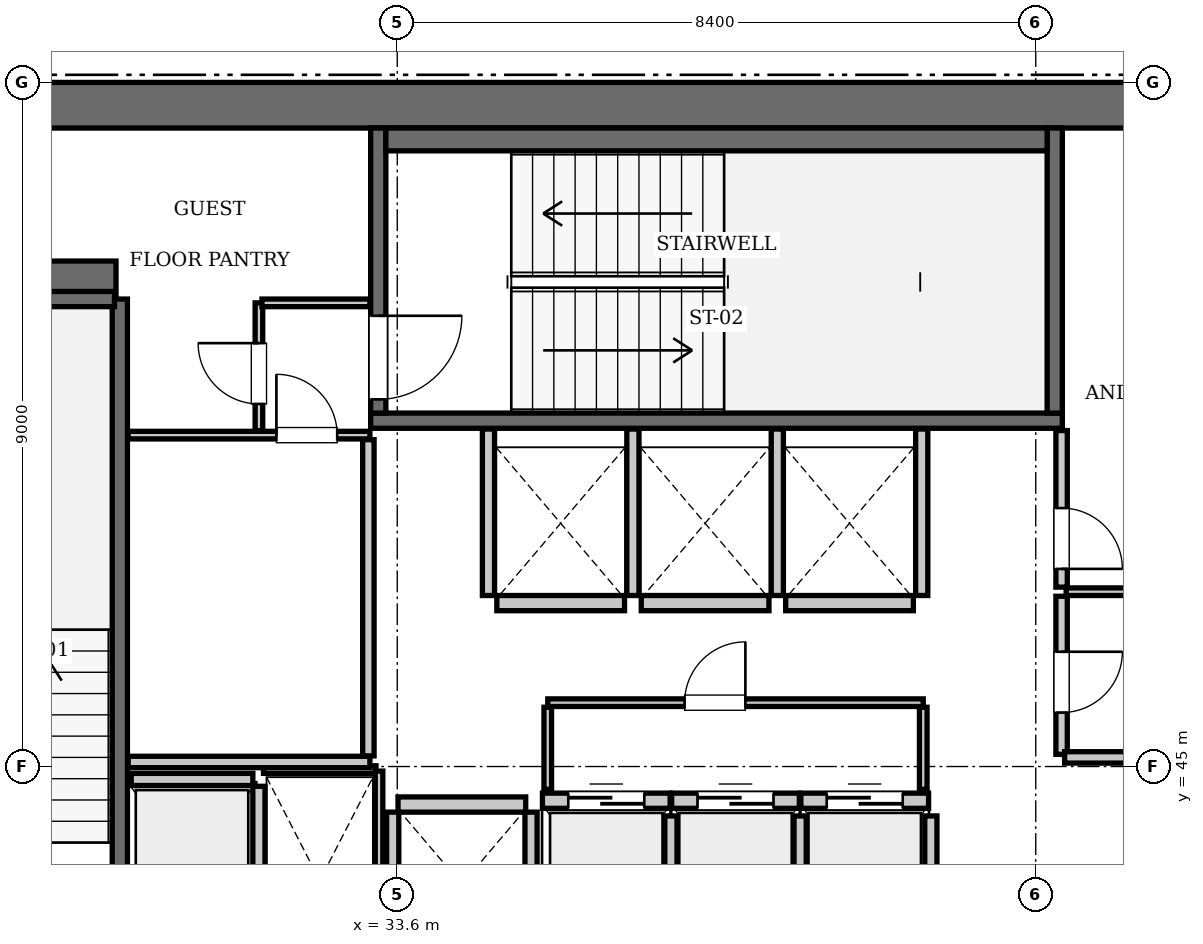
"""IFC4 building model, lengths in metres.
Left out: names, types, materials, properties, quantities, classifications, styles, units other than length and angle.
Written with IfcOpenShell. Run it as: python <this file> out.ifc"""

import sys

from ifc_helpers import new_model, si_unit, direction, frame, frame_2d, origin, place, context, subcontext, project, spatial, rectangle, extrude, element, fill, save


model = new_model("IFC4")
c1 = context("Model", 3, precision=1e-05, world=origin(), true_north=direction((0.0, 1.0)))
c2 = subcontext(c1, "Body", "Model", "MODEL_VIEW")
j1 = project(units=[si_unit("LENGTHUNIT", "METRE"), si_unit("PLANEANGLEUNIT", "RADIAN")], contexts=[c1])
p1 = place(None, origin())
s1 = spatial("IfcSite", under=j1, at=p1, CompositionType="ELEMENT")
p2 = place(p1, origin())
s2 = spatial("IfcBuilding", under=s1, at=p2, CompositionType="ELEMENT")
p3 = place(p2, frame((0.0, 0.0, 341.25)))
s3 = spatial("IfcBuildingStorey", under=s2, at=p3, CompositionType="ELEMENT", Elevation=341.25)
p4 = place(p3, frame((25.2, 53.7, 0.0), z_axis=(0.0, 0.0, 1.0), x_axis=(1.0, 0.0, 0.0)))
e1 = element("IfcWall", 1, at=p4, inside=s3, PredefinedType="SHEAR", context=c2, shape_type="SweptSolid", body=[
    extrude(rectangle(XDim=25.2, YDim=0.6, at=frame_2d((12.6, 0.0))), origin(), (0.0, 0.0, 1.0), 3.85),
])
p5 = place(p3, frame((25.8, 51.4, 0.0), z_axis=(0.0, 0.0, 1.0), x_axis=(1.0, 0.0, 0.0)))
e2 = element("IfcWall", 2, at=p5, inside=s3, PredefinedType="SHEAR", context=c2, shape_type="SweptSolid", body=[
    extrude(rectangle(XDim=4.1, YDim=0.5, at=frame_2d((2.05, 0.0))), origin(), (0.0, 0.0, 1.0), 3.85),
])
p6 = place(p3, frame((29.95, 42.0, 0.0), z_axis=(0.0, 0.0, 1.0), x_axis=(0.0, 1.0, 0.0)))
e3 = element("IfcWall", 3, at=p6, inside=s3, PredefinedType="SOLIDWALL", context=c2, shape_type="SweptSolid", body=[
    extrude(rectangle(XDim=9.15, YDim=0.2, at=frame_2d((4.575, 0.0))), origin(), (0.0, 0.0, 1.0), 3.61),
])
p7 = place(p3, frame((26.38, 51.15, 0.0), z_axis=(0.0, 0.0, 1.0), x_axis=(1.0, 0.0, 0.0)))
e4 = element("IfcWall", 4, at=p7, inside=s3, PredefinedType="SOLIDWALL", context=c2, shape_type="SweptSolid", body=[
    extrude(rectangle(XDim=3.5, YDim=0.2, at=frame_2d((1.75, 0.0))), origin(), (0.0, 0.0, 1.0), 3.61),
])
p8 = place(p3, frame((33.25, 49.55, 0.0), z_axis=(0.0, 0.0, 1.0), x_axis=(1.0, 0.0, 0.0)))
e5 = element("IfcWall", 5, at=p8, inside=s3, PredefinedType="SOLIDWALL", context=c2, shape_type="SweptSolid", body=[
    extrude(rectangle(XDim=9.1, YDim=0.2, at=frame_2d((4.55, 0.0))), origin(), (0.0, 0.0, 1.0), 3.61),
])
p9 = place(p3, frame((42.25, 49.65, 0.0), z_axis=(0.0, 0.0, 1.0), x_axis=(0.0, 1.0, 0.0)))
e6 = element("IfcWall", 6, at=p9, inside=s3, PredefinedType="SOLIDWALL", context=c2, shape_type="SweptSolid", body=[
    extrude(rectangle(XDim=3.75, YDim=0.2, at=frame_2d((1.875, 0.0))), origin(), (0.0, 0.0, 1.0), 3.61),
])
p10 = place(p3, frame((33.35, 49.65, 0.0), z_axis=(0.0, 0.0, 1.0), x_axis=(0.0, 1.0, 0.0)))
e7 = element("IfcWall", 7, at=p10, inside=s3, PredefinedType="SOLIDWALL", context=c2, shape_type="SweptSolid", body=[
    extrude(rectangle(XDim=3.75, YDim=0.2, at=frame_2d((1.875, 0.0))), origin(), (0.0, 0.0, 1.0), 3.61),
])
p11 = place(p10, frame((0.18, 0.0, 0.0)))
e8 = element("IfcOpeningElement", 8, at=p11, cuts=e7, PredefinedType="OPENING", context=c2, shape_type="SweptSolid", body=[
    extrude(rectangle(XDim=1.1, YDim=2.15, at=frame_2d((0.55, 1.075))), frame((0.0, 0.11, 0.0), z_axis=(0.0, -1.0, 0.0), x_axis=(1.0, 0.0, 0.0)), (0.0, 0.0, 1.0), 0.22),
])
p12 = place(p3, frame((33.45, 53.25, 0.0), z_axis=(0.0, 0.0, 1.0), x_axis=(1.0, 0.0, 0.0)))
e9 = element("IfcWall", 9, at=p12, inside=s3, PredefinedType="SOLIDWALL", context=c2, shape_type="SweptSolid", body=[
    extrude(rectangle(XDim=8.7, YDim=0.3, at=frame_2d((4.35, 0.0))), origin(), (0.0, 0.0, 1.0), 3.61),
])
p13 = place(p3, frame((35.51, 44.55, 0.0), z_axis=(0.0, 0.0, 1.0), x_axis=(1.0, 0.0, 0.0)))
e10 = element("IfcWall", 10, at=p13, inside=s3, PredefinedType="SOLIDWALL", context=c2, shape_type="SweptSolid", body=[
    extrude(rectangle(XDim=1.68, YDim=0.2, at=frame_2d((0.84, 0.0))), origin(), (0.0, 0.0, 1.0), 3.61),
])
p14 = place(p13, frame((0.34, 0.0, 0.0)))
e11 = element("IfcOpeningElement", 11, at=p14, cuts=e10, PredefinedType="OPENING", context=c2, shape_type="SweptSolid", body=[
    extrude(rectangle(XDim=1.0, YDim=2.15, at=frame_2d((0.5, 1.075))), frame((0.0, 0.11, 0.0), z_axis=(0.0, -1.0, 0.0), x_axis=(1.0, 0.0, 0.0)), (0.0, 0.0, 1.0), 0.22),
])
p15 = place(p3, frame((37.21, 44.55, 0.0), z_axis=(0.0, 0.0, 1.0), x_axis=(1.0, 0.0, 0.0)))
e12 = element("IfcWall", 12, at=p15, inside=s3, PredefinedType="SOLIDWALL", context=c2, shape_type="SweptSolid", body=[
    extrude(rectangle(XDim=1.68, YDim=0.2, at=frame_2d((0.84, 0.0))), origin(), (0.0, 0.0, 1.0), 3.61),
])
p16 = place(p15, frame((0.34, 0.0, 0.0)))
e13 = element("IfcOpeningElement", 13, at=p16, cuts=e12, PredefinedType="OPENING", context=c2, shape_type="SweptSolid", body=[
    extrude(rectangle(XDim=1.0, YDim=2.15, at=frame_2d((0.5, 1.075))), frame((0.0, 0.11, 0.0), z_axis=(0.0, -1.0, 0.0), x_axis=(1.0, 0.0, 0.0)), (0.0, 0.0, 1.0), 0.22),
])
p17 = place(p3, frame((38.91, 44.55, 0.0), z_axis=(0.0, 0.0, 1.0), x_axis=(1.0, 0.0, 0.0)))
e14 = element("IfcWall", 14, at=p17, inside=s3, PredefinedType="SOLIDWALL", context=c2, shape_type="SweptSolid", body=[
    extrude(rectangle(XDim=1.68, YDim=0.2, at=frame_2d((0.84, 0.0))), origin(), (0.0, 0.0, 1.0), 3.61),
])
p18 = place(p17, frame((0.34, 0.0, 0.0)))
e15 = element("IfcOpeningElement", 15, at=p18, cuts=e14, PredefinedType="OPENING", context=c2, shape_type="SweptSolid", body=[
    extrude(rectangle(XDim=1.0, YDim=2.15, at=frame_2d((0.5, 1.075))), frame((0.0, 0.11, 0.0), z_axis=(0.0, -1.0, 0.0), x_axis=(1.0, 0.0, 0.0)), (0.0, 0.0, 1.0), 0.22),
])
p19 = place(p3, frame((34.91, 47.15, 0.0), z_axis=(0.0, 0.0, 1.0), x_axis=(1.0, 0.0, 0.0)))
e16 = element("IfcWall", 16, at=p19, inside=s3, PredefinedType="SOLIDWALL", context=c2, shape_type="SweptSolid", body=[
    extrude(rectangle(XDim=1.68, YDim=0.2, at=frame_2d((0.84, 0.0))), origin(), (0.0, 0.0, 1.0), 3.61),
])
for number, where, z_axis, x_axis in (
    (17, (36.81, 47.15, 0.0), (0.0, 0.0, 1.0), (1.0, 0.0, 0.0)),
    (18, (38.71, 47.15, 0.0), (0.0, 0.0, 1.0), (1.0, 0.0, 0.0)),
    (19, (33.61, 44.5, 0.0), (0.0, 0.0, 1.0), (1.0, 0.0, 0.0)),
):
    element("IfcWall", number, at=place(p3, frame(where, z_axis=z_axis, x_axis=x_axis)), inside=s3, PredefinedType="SOLIDWALL", context=c2, shape_type="SweptSolid", body=[
        extrude(rectangle(XDim=1.68, YDim=0.2, at=frame_2d((0.84, 0.0))), origin(), (0.0, 0.0, 1.0), 3.61),
    ])
p20 = place(p3, frame((30.1, 44.83, 0.0), z_axis=(0.0, 0.0, 1.0), x_axis=(1.0, 0.0, 0.0)))
e20 = element("IfcWall", 20, at=p20, inside=s3, PredefinedType="SOLIDWALL", context=c2, shape_type="SweptSolid", body=[
    extrude(rectangle(XDim=1.6, YDim=0.16, at=frame_2d((0.8, 0.0))), origin(), (0.0, 0.0, 1.0), 3.61),
])
p21 = place(p3, frame((31.78, 42.0, 0.0), z_axis=(0.0, 0.0, 1.0), x_axis=(0.0, 1.0, 0.0)))
e21 = element("IfcWall", 21, at=p21, inside=s3, PredefinedType="SOLIDWALL", context=c2, shape_type="SweptSolid", body=[
    extrude(rectangle(XDim=2.74, YDim=0.16, at=frame_2d((1.37, 0.0))), origin(), (0.0, 0.0, 1.0), 3.61),
])
for number, where, z_axis, x_axis in (
    (22, (37.2, 42.0, 0.0), (0.0, 0.0, 1.0), (0.0, 1.0, 0.0)),
    (23, (38.9, 42.0, 0.0), (0.0, 0.0, 1.0), (0.0, 1.0, 0.0)),
    (24, (40.62, 42.0, 0.0), (0.0, 0.0, 1.0), (0.0, 1.0, 0.0)),
):
    element("IfcWall", number, at=place(p3, frame(where, z_axis=z_axis, x_axis=x_axis)), inside=s3, PredefinedType="SOLIDWALL", context=c2, shape_type="SweptSolid", body=[
        extrude(rectangle(XDim=2.35, YDim=0.16, at=frame_2d((1.175, 0.0))), origin(), (0.0, 0.0, 1.0), 3.61),
    ])
for number, where, z_axis, x_axis in (
    (25, (34.8, 47.25, 0.0), (0.0, 0.0, 1.0), (0.0, 1.0, 0.0)),
    (26, (36.7, 47.25, 0.0), (0.0, 0.0, 1.0), (0.0, 1.0, 0.0)),
    (27, (38.6, 47.25, 0.0), (0.0, 0.0, 1.0), (0.0, 1.0, 0.0)),
    (28, (40.5, 47.25, 0.0), (0.0, 0.0, 1.0), (0.0, 1.0, 0.0)),
):
    element("IfcWall", number, at=place(p3, frame(where, z_axis=z_axis, x_axis=x_axis)), inside=s3, PredefinedType="SOLIDWALL", context=c2, shape_type="SweptSolid", body=[
        extrude(rectangle(XDim=2.19, YDim=0.16, at=frame_2d((1.095, 0.0))), origin(), (0.0, 0.0, 1.0), 3.61),
    ])
for number, where, z_axis, x_axis in (
    (29, (33.54, 42.0, 0.0), (0.0, 0.0, 1.0), (0.0, 1.0, 0.0)),
    (30, (35.36, 42.0, 0.0), (0.0, 0.0, 1.0), (0.0, 1.0, 0.0)),
):
    element("IfcWall", number, at=place(p3, frame(where, z_axis=z_axis, x_axis=x_axis)), inside=s3, PredefinedType="SOLIDWALL", context=c2, shape_type="SweptSolid", body=[
        extrude(rectangle(XDim=2.4, YDim=0.16, at=frame_2d((1.2, 0.0))), origin(), (0.0, 0.0, 1.0), 3.61),
    ])
p22 = place(p3, frame((31.84, 44.96, 0.0), z_axis=(0.0, 0.0, 1.0), x_axis=(1.0, 0.0, 0.0)))
e31 = element("IfcWall", 31, at=p22, inside=s3, PredefinedType="PARTITIONING", context=c2, shape_type="SweptSolid", body=[
    extrude(rectangle(XDim=1.48, YDim=0.1, at=frame_2d((0.74, 0.0))), origin(), (0.0, 0.0, 1.0), 3.61),
])
p23 = place(p3, frame((33.36, 42.06, 0.0), z_axis=(0.0, 0.0, 1.0), x_axis=(0.0, 1.0, 0.0)))
e32 = element("IfcWall", 32, at=p23, inside=s3, PredefinedType="PARTITIONING", context=c2, shape_type="SweptSolid", body=[
    extrude(rectangle(XDim=2.88, YDim=0.1, at=frame_2d((1.44, 0.0))), origin(), (0.0, 0.0, 1.0), 3.61),
])
p24 = place(p3, frame((35.58, 45.84, 0.0), z_axis=(0.0, 0.0, 1.0), x_axis=(1.0, 0.0, 0.0)))
e33 = element("IfcWall", 33, at=p24, inside=s3, PredefinedType="PARTITIONING", context=c2, shape_type="SweptSolid", body=[
    extrude(rectangle(XDim=4.94, YDim=0.1, at=frame_2d((2.47, 0.0))), origin(), (0.0, 0.0, 1.0), 3.61),
])
p25 = place(p24, frame((1.8, 0.0, 0.0)))
e34 = element("IfcOpeningElement", 34, at=p25, cuts=e33, PredefinedType="OPENING", context=c2, shape_type="SweptSolid", body=[
    extrude(rectangle(XDim=0.8, YDim=2.05, at=frame_2d((0.4, 1.025))), frame((0.0, 0.06, 0.0), z_axis=(0.0, -1.0, 0.0), x_axis=(1.0, 0.0, 0.0)), (0.0, 0.0, 1.0), 0.12),
])
for number, where, z_axis, x_axis in (
    (35, (35.58, 44.7, 0.0), (0.0, 0.0, 1.0), (0.0, 1.0, 0.0)),
    (36, (40.52, 44.7, 0.0), (0.0, 0.0, 1.0), (0.0, 1.0, 0.0)),
):
    element("IfcWall", number, at=place(p3, frame(where, z_axis=z_axis, x_axis=x_axis)), inside=s3, PredefinedType="PARTITIONING", context=c2, shape_type="SweptSolid", body=[
        extrude(rectangle(XDim=1.08, YDim=0.1, at=frame_2d((0.54, 0.0))), origin(), (0.0, 0.0, 1.0), 3.61),
    ])
p26 = place(p3, frame((30.06, 45.06, 0.0), z_axis=(0.0, 0.0, 1.0), x_axis=(1.0, 0.0, 0.0)))
e37 = element("IfcWall", 37, at=p26, inside=s3, PredefinedType="PARTITIONING", context=c2, shape_type="SweptSolid", body=[
    extrude(rectangle(XDim=3.18, YDim=0.15, at=frame_2d((1.59, 0.0))), origin(), (0.0, 0.0, 1.0), 3.61),
])
p27 = place(p3, frame((33.22, 45.14, 0.0), z_axis=(0.0, 0.0, 1.0), x_axis=(0.0, 1.0, 0.0)))
e38 = element("IfcWall", 38, at=p27, inside=s3, PredefinedType="PARTITIONING", context=c2, shape_type="SweptSolid", body=[
    extrude(rectangle(XDim=4.16, YDim=0.15, at=frame_2d((2.08, 0.0))), origin(), (0.0, 0.0, 1.0), 3.61),
])
p28 = place(p3, frame((30.06, 49.36, 0.0), z_axis=(0.0, 0.0, 1.0), x_axis=(1.0, 0.0, 0.0)))
e39 = element("IfcWall", 39, at=p28, inside=s3, PredefinedType="PARTITIONING", context=c2, shape_type="SweptSolid", body=[
    extrude(rectangle(XDim=3.18, YDim=0.1, at=frame_2d((1.59, 0.0))), origin(), (0.0, 0.0, 1.0), 3.61),
])
p29 = place(p28, frame((1.95, 0.0, 0.0)))
e40 = element("IfcOpeningElement", 40, at=p29, cuts=e39, PredefinedType="OPENING", context=c2, shape_type="SweptSolid", body=[
    extrude(rectangle(XDim=0.8, YDim=2.05, at=frame_2d((0.4, 1.025))), frame((0.0, 0.06, 0.0), z_axis=(0.0, -1.0, 0.0), x_axis=(1.0, 0.0, 0.0)), (0.0, 0.0, 1.0), 0.12),
])
p30 = place(p3, frame((31.78, 49.42, 0.0), z_axis=(0.0, 0.0, 1.0), x_axis=(0.0, 1.0, 0.0)))
e41 = element("IfcWall", 41, at=p30, inside=s3, PredefinedType="PARTITIONING", context=c2, shape_type="SweptSolid", body=[
    extrude(rectangle(XDim=1.68, YDim=0.1, at=frame_2d((0.84, 0.0))), origin(), (0.0, 0.0, 1.0), 3.61),
])
p31 = place(p30, frame((0.35, 0.0, 0.0)))
e42 = element("IfcOpeningElement", 42, at=p31, cuts=e41, PredefinedType="OPENING", context=c2, shape_type="SweptSolid", body=[
    extrude(rectangle(XDim=0.8, YDim=2.05, at=frame_2d((0.4, 1.025))), frame((0.0, 0.06, 0.0), z_axis=(0.0, -1.0, 0.0), x_axis=(1.0, 0.0, 0.0)), (0.0, 0.0, 1.0), 0.12),
])
p32 = place(p3, frame((31.82, 51.1, 0.0), z_axis=(0.0, 0.0, 1.0), x_axis=(1.0, 0.0, 0.0)))
e43 = element("IfcWall", 43, at=p32, inside=s3, PredefinedType="PARTITIONING", context=c2, shape_type="SweptSolid", body=[
    extrude(rectangle(XDim=1.42, YDim=0.1, at=frame_2d((0.71, 0.0))), origin(), (0.0, 0.0, 1.0), 3.61),
])
p33 = place(p3, frame((42.34, 45.16, 0.0), z_axis=(0.0, 0.0, 1.0), x_axis=(0.0, 1.0, 0.0)))
e44 = element("IfcWall", 44, at=p33, inside=s3, PredefinedType="PARTITIONING", context=c2, shape_type="SweptSolid", body=[
    extrude(rectangle(XDim=2.08, YDim=0.15, at=frame_2d((1.04, 0.0))), origin(), (0.0, 0.0, 1.0), 3.61),
])
p34 = place(p33, frame((0.55, 0.0, 0.0)))
e45 = element("IfcOpeningElement", 45, at=p34, cuts=e44, PredefinedType="OPENING", context=c2, shape_type="SweptSolid", body=[
    extrude(rectangle(XDim=0.8, YDim=2.05, at=frame_2d((0.4, 1.025))), frame((0.0, 0.085, 0.0), z_axis=(0.0, -1.0, 0.0), x_axis=(1.0, 0.0, 0.0)), (0.0, 0.0, 1.0), 0.17),
])
p35 = place(p3, frame((42.34, 47.36, 0.0), z_axis=(0.0, 0.0, 1.0), x_axis=(0.0, 1.0, 0.0)))
e46 = element("IfcWall", 46, at=p35, inside=s3, PredefinedType="PARTITIONING", context=c2, shape_type="SweptSolid", body=[
    extrude(rectangle(XDim=2.06, YDim=0.15, at=frame_2d((1.03, 0.0))), origin(), (0.0, 0.0, 1.0), 3.61),
])
p36 = place(p35, frame((0.24, 0.0, 0.0)))
e47 = element("IfcOpeningElement", 47, at=p36, cuts=e46, PredefinedType="OPENING", context=c2, shape_type="SweptSolid", body=[
    extrude(rectangle(XDim=0.8, YDim=2.05, at=frame_2d((0.4, 1.025))), frame((0.0, 0.085, 0.0), z_axis=(0.0, -1.0, 0.0), x_axis=(1.0, 0.0, 0.0)), (0.0, 0.0, 1.0), 0.17),
])
p37 = place(p3, frame((42.4, 47.3, 0.0), z_axis=(0.0, 0.0, 1.0), x_axis=(1.0, 0.0, 0.0)))
e48 = element("IfcWall", 48, at=p37, inside=s3, PredefinedType="PARTITIONING", context=c2, shape_type="SweptSolid", body=[
    extrude(rectangle(XDim=3.1, YDim=0.1, at=frame_2d((1.55, 0.0))), origin(), (0.0, 0.0, 1.0), 3.61),
])
p38 = place(p3, frame((42.38, 45.12, 0.0), z_axis=(0.0, 0.0, 1.0), x_axis=(1.0, 0.0, 0.0)))
e49 = element("IfcWall", 49, at=p38, inside=s3, PredefinedType="PARTITIONING", context=c2, shape_type="SweptSolid", body=[
    extrude(rectangle(XDim=3.14, YDim=0.15, at=frame_2d((1.57, 0.0))), origin(), (0.0, 0.0, 1.0), 3.61),
])
p39 = place(p11, frame((1.1, 0.0, 0.0), z_axis=(0.0, 0.0, 1.0), x_axis=(-1.0, 0.0, 0.0)))
e50 = element("IfcDoor", 50, at=p39, inside=s3, OperationType="SINGLE_SWING_LEFT", PredefinedType="DOOR", context=c2, shape_type="SweptSolid", body=[
    extrude(rectangle(XDim=1.1, YDim=2.15, at=frame_2d((0.55, 1.075))), frame((0.0, 0.025, 0.0), z_axis=(0.0, -1.0, 0.0), x_axis=(1.0, 0.0, 0.0)), (0.0, 0.0, 1.0), 0.05),
])
fill(e8, e50)
p40 = place(p14, origin())
e51 = element("IfcDoor", 51, at=p40, inside=s3, OperationType="SLIDING_TO_LEFT", PredefinedType="DOOR", context=c2, shape_type="SweptSolid", body=[
    extrude(rectangle(XDim=1.0, YDim=2.15, at=frame_2d((0.5, 1.075))), frame((0.0, 0.025, 0.0), z_axis=(0.0, -1.0, 0.0), x_axis=(1.0, 0.0, 0.0)), (0.0, 0.0, 1.0), 0.05),
])
fill(e11, e51)
p41 = place(p16, origin())
e52 = element("IfcDoor", 52, at=p41, inside=s3, OperationType="SLIDING_TO_LEFT", PredefinedType="DOOR", context=c2, shape_type="SweptSolid", body=[
    extrude(rectangle(XDim=1.0, YDim=2.15, at=frame_2d((0.5, 1.075))), frame((0.0, 0.025, 0.0), z_axis=(0.0, -1.0, 0.0), x_axis=(1.0, 0.0, 0.0)), (0.0, 0.0, 1.0), 0.05),
])
fill(e13, e52)
p42 = place(p18, origin())
e53 = element("IfcDoor", 53, at=p42, inside=s3, OperationType="SLIDING_TO_LEFT", PredefinedType="DOOR", context=c2, shape_type="SweptSolid", body=[
    extrude(rectangle(XDim=1.0, YDim=2.15, at=frame_2d((0.5, 1.075))), frame((0.0, 0.025, 0.0), z_axis=(0.0, -1.0, 0.0), x_axis=(1.0, 0.0, 0.0)), (0.0, 0.0, 1.0), 0.05),
])
fill(e15, e53)
p43 = place(p25, origin())
e54 = element("IfcDoor", 54, at=p43, inside=s3, OperationType="SINGLE_SWING_RIGHT", PredefinedType="DOOR", context=c2, shape_type="SweptSolid", body=[
    extrude(rectangle(XDim=0.8, YDim=2.05, at=frame_2d((0.4, 1.025))), frame((0.0, 0.025, 0.0), z_axis=(0.0, -1.0, 0.0), x_axis=(1.0, 0.0, 0.0)), (0.0, 0.0, 1.0), 0.05),
])
fill(e34, e54)
p44 = place(p29, origin())
e55 = element("IfcDoor", 55, at=p44, inside=s3, OperationType="SINGLE_SWING_LEFT", PredefinedType="DOOR", context=c2, shape_type="SweptSolid", body=[
    extrude(rectangle(XDim=0.8, YDim=2.05, at=frame_2d((0.4, 1.025))), frame((0.0, 0.025, 0.0), z_axis=(0.0, -1.0, 0.0), x_axis=(1.0, 0.0, 0.0)), (0.0, 0.0, 1.0), 0.05),
])
fill(e40, e55)
p45 = place(p31, origin())
e56 = element("IfcDoor", 56, at=p45, inside=s3, OperationType="SINGLE_SWING_RIGHT", PredefinedType="DOOR", context=c2, shape_type="SweptSolid", body=[
    extrude(rectangle(XDim=0.8, YDim=2.05, at=frame_2d((0.4, 1.025))), frame((0.0, 0.025, 0.0), z_axis=(0.0, -1.0, 0.0), x_axis=(1.0, 0.0, 0.0)), (0.0, 0.0, 1.0), 0.05),
])
fill(e42, e56)
p46 = place(p34, frame((0.8, 0.0, 0.0), z_axis=(0.0, 0.0, 1.0), x_axis=(-1.0, 0.0, 0.0)))
e57 = element("IfcDoor", 57, at=p46, inside=s3, OperationType="SINGLE_SWING_LEFT", PredefinedType="DOOR", context=c2, shape_type="SweptSolid", body=[
    extrude(rectangle(XDim=0.8, YDim=2.05, at=frame_2d((0.4, 1.025))), frame((0.0, 0.025, 0.0), z_axis=(0.0, -1.0, 0.0), x_axis=(1.0, 0.0, 0.0)), (0.0, 0.0, 1.0), 0.05),
])
fill(e45, e57)
p47 = place(p36, frame((0.8, 0.0, 0.0), z_axis=(0.0, 0.0, 1.0), x_axis=(-1.0, 0.0, 0.0)))
e58 = element("IfcDoor", 58, at=p47, inside=s3, OperationType="SINGLE_SWING_RIGHT", PredefinedType="DOOR", context=c2, shape_type="SweptSolid", body=[
    extrude(rectangle(XDim=0.8, YDim=2.05, at=frame_2d((0.4, 1.025))), frame((0.0, 0.025, 0.0), z_axis=(0.0, -1.0, 0.0), x_axis=(1.0, 0.0, 0.0)), (0.0, 0.0, 1.0), 0.05),
])
fill(e47, e58)
save(model, sys.argv[1])
